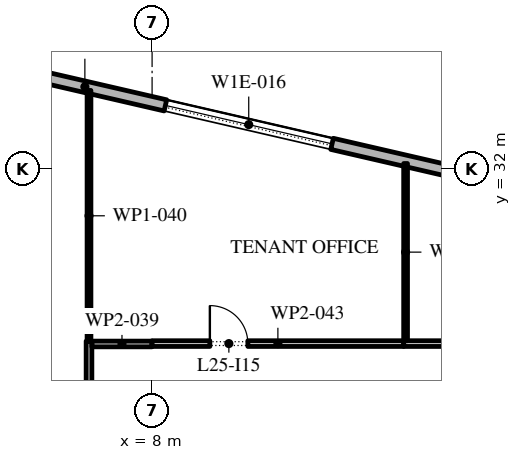
"""IFC4 building model, lengths in metres.
Left out: names, types, materials, properties, quantities, classifications, styles, units other than length and angle.
Written with IfcOpenShell. Run it as: python <this file> out.ifc"""

import sys

from ifc_helpers import new_model, si_unit, direction, frame, frame_2d, origin, place, context, subcontext, project, spatial, rectangle, extrude, element, fill, save


model = new_model("IFC4")
c1 = context("Model", 3, precision=1e-05, world=origin(), true_north=direction((0.0, 1.0)))
c2 = subcontext(c1, "Body", "Model", "MODEL_VIEW")
j1 = project(units=[si_unit("LENGTHUNIT", "METRE"), si_unit("PLANEANGLEUNIT", "RADIAN")], contexts=[c1])
p1 = place(None, origin())
s1 = spatial("IfcSite", under=j1, at=p1, CompositionType="ELEMENT")
p2 = place(p1, origin())
s2 = spatial("IfcBuilding", under=s1, at=p2, CompositionType="ELEMENT")
p3 = place(p2, frame((0.0, 0.0, 118.2)))
s3 = spatial("IfcBuildingStorey", under=s2, at=p3, CompositionType="ELEMENT", Elevation=118.2)
p4 = place(p3, frame((31.078, 28.421, 0.0), z_axis=(0.0, 0.0, 1.0), x_axis=(-0.974370456532, 0.224949357493, 0.0)))
e1 = element("IfcWall", 1, at=p4, inside=s3, PredefinedType="STANDARD", context=c2, shape_type="SweptSolid", body=[
    extrude(rectangle(XDim=51.0, YDim=0.3, at=frame_2d((25.5, 0.0))), origin(), (0.0, 0.0, 1.0), 4.0),
])
p5 = place(p4, frame((1.875, 0.0, 0.45)))
e2 = element("IfcOpeningElement", 2, at=p5, cuts=e1, PredefinedType="OPENING", context=c2, shape_type="SweptSolid", body=[
    extrude(rectangle(XDim=4.5, YDim=3.0, at=frame_2d((2.25, 1.5))), frame((0.0, 0.16, 0.0), z_axis=(0.0, -1.0, 0.0), x_axis=(1.0, 0.0, 0.0)), (0.0, 0.0, 1.0), 0.32),
])
p6 = place(p4, frame((10.275, 0.0, 0.45)))
e3 = element("IfcOpeningElement", 3, at=p6, cuts=e1, PredefinedType="OPENING", context=c2, shape_type="SweptSolid", body=[
    extrude(rectangle(XDim=4.5, YDim=2.875, at=frame_2d((2.25, 1.438))), frame((0.0, 0.16, 0.0), z_axis=(0.0, -1.0, 0.0), x_axis=(1.0, 0.0, 0.0)), (0.0, 0.0, 1.0), 0.32),
])
p7 = place(p4, frame((18.825, 0.0, 0.45)))
e4 = element("IfcOpeningElement", 4, at=p7, cuts=e1, PredefinedType="OPENING", context=c2, shape_type="SweptSolid", body=[
    extrude(rectangle(XDim=4.5, YDim=2.825, at=frame_2d((2.25, 1.413))), frame((0.0, 0.16, 0.0), z_axis=(0.0, -1.0, 0.0), x_axis=(1.0, 0.0, 0.0)), (0.0, 0.0, 1.0), 0.32),
])
p8 = place(p4, frame((27.075, 0.0, 0.0)))
e5 = element("IfcOpeningElement", 5, at=p8, cuts=e1, PredefinedType="OPENING", context=c2, shape_type="SweptSolid", body=[
    extrude(rectangle(XDim=2.4, YDim=3.2, at=frame_2d((1.2, 1.6))), frame((0.0, 0.16, 0.0), z_axis=(0.0, -1.0, 0.0), x_axis=(1.0, 0.0, 0.0)), (0.0, 0.0, 1.0), 0.32),
])
p9 = place(p4, frame((35.925, 0.0, 0.45)))
e6 = element("IfcOpeningElement", 6, at=p9, cuts=e1, PredefinedType="OPENING", context=c2, shape_type="SweptSolid", body=[
    extrude(rectangle(XDim=4.5, YDim=2.575, at=frame_2d((2.25, 1.288))), frame((0.0, 0.16, 0.0), z_axis=(0.0, -1.0, 0.0), x_axis=(1.0, 0.0, 0.0)), (0.0, 0.0, 1.0), 0.32),
])
p10 = place(p4, frame((44.475, 0.0, 0.45)))
e7 = element("IfcOpeningElement", 7, at=p10, cuts=e1, PredefinedType="OPENING", context=c2, shape_type="SweptSolid", body=[
    extrude(rectangle(XDim=4.5, YDim=3.05, at=frame_2d((2.25, 1.525))), frame((0.0, 0.16, 0.0), z_axis=(0.0, -1.0, 0.0), x_axis=(1.0, 0.0, 0.0)), (0.0, 0.0, 1.0), 0.32),
])
p11 = place(p3, frame((6.34, 19.075, 0.0), z_axis=(0.0, 0.0, 1.0), x_axis=(0.0, 1.0, 0.0)))
e8 = element("IfcWall", 8, at=p11, inside=s3, PredefinedType="PARTITIONING", context=c2, shape_type="SweptSolid", body=[
    extrude(rectangle(XDim=8.39, YDim=0.15, at=frame_2d((4.195, 0.0))), origin(), (0.0, 0.0, 1.0), 4.0),
])
p12 = place(p11, frame((3.665, 0.0, 0.0)))
e9 = element("IfcOpeningElement", 9, at=p12, cuts=e8, PredefinedType="OPENING", context=c2, shape_type="SweptSolid", body=[
    extrude(rectangle(XDim=1.0, YDim=2.1, at=frame_2d((0.5, 1.05))), frame((0.0, 0.085, 0.0), z_axis=(0.0, -1.0, 0.0), x_axis=(1.0, 0.0, 0.0)), (0.0, 0.0, 1.0), 0.17),
])
p13 = place(p3, frame((6.415, 27.39, 0.0), z_axis=(0.0, 0.0, 1.0), x_axis=(1.0, 0.0, 0.0)))
e10 = element("IfcWall", 10, at=p13, inside=s3, PredefinedType="PARTITIONING", context=c2, shape_type="SweptSolid", body=[
    extrude(rectangle(XDim=1.585, YDim=0.15, at=frame_2d((0.792, 0.0))), origin(), (0.0, 0.0, 1.0), 4.0),
])
p14 = place(p3, frame((6.34, 34.061, 0.0), z_axis=(0.0, 0.0, 1.0), x_axis=(0.0, -1.0, 0.0)))
e11 = element("IfcWall", 11, at=p14, inside=s3, PredefinedType="PARTITIONING", context=c2, shape_type="SweptSolid", body=[
    extrude(rectangle(XDim=6.596, YDim=0.1, at=frame_2d((3.298, 0.0))), origin(), (0.0, 0.0, 1.0), 4.0),
])
p15 = place(p3, frame((8.0, 27.4, 0.0), z_axis=(0.0, 0.0, 1.0), x_axis=(1.0, 0.0, 0.0)))
e12 = element("IfcWall", 12, at=p15, inside=s3, PredefinedType="PARTITIONING", context=c2, shape_type="SweptSolid", body=[
    extrude(rectangle(XDim=6.62, YDim=0.15, at=frame_2d((3.31, 0.0))), origin(), (0.0, 0.0, 1.0), 4.0),
])
p16 = place(p15, frame((1.52, 0.0, 0.0)))
e13 = element("IfcOpeningElement", 13, at=p16, cuts=e12, PredefinedType="OPENING", context=c2, shape_type="SweptSolid", body=[
    extrude(rectangle(XDim=1.0, YDim=2.1, at=frame_2d((0.5, 1.05))), frame((0.0, 0.085, 0.0), z_axis=(0.0, -1.0, 0.0), x_axis=(1.0, 0.0, 0.0)), (0.0, 0.0, 1.0), 0.17),
])
p17 = place(p3, frame((14.62, 27.4, 0.0), z_axis=(0.0, 0.0, 1.0), x_axis=(1.0, 0.0, 0.0)))
e14 = element("IfcWall", 14, at=p17, inside=s3, PredefinedType="PARTITIONING", context=c2, shape_type="SweptSolid", body=[
    extrude(rectangle(XDim=8.44, YDim=0.15, at=frame_2d((4.22, 0.0))), origin(), (0.0, 0.0, 1.0), 4.0),
])
p18 = place(p17, frame((2.99, 0.0, 0.0)))
e15 = element("IfcOpeningElement", 15, at=p18, cuts=e14, PredefinedType="OPENING", context=c2, shape_type="SweptSolid", body=[
    extrude(rectangle(XDim=1.0, YDim=2.1, at=frame_2d((0.5, 1.05))), frame((0.0, 0.085, 0.0), z_axis=(0.0, -1.0, 0.0), x_axis=(1.0, 0.0, 0.0)), (0.0, 0.0, 1.0), 0.17),
])
p19 = place(p3, frame((14.67, 32.138, 0.0), z_axis=(0.0, 0.0, 1.0), x_axis=(0.0, -1.0, 0.0)))
e16 = element("IfcWall", 16, at=p19, inside=s3, PredefinedType="PARTITIONING", context=c2, shape_type="SweptSolid", body=[
    extrude(rectangle(XDim=4.663, YDim=0.1, at=frame_2d((2.332, 0.0))), origin(), (0.0, 0.0, 1.0), 4.0),
])
p20 = place(p7, origin())
e17 = element("IfcWindow", 17, at=p20, inside=s3, PartitioningType="DOUBLE_PANEL_VERTICAL", PredefinedType="WINDOW", context=c2, shape_type="SweptSolid", body=[
    extrude(rectangle(XDim=4.5, YDim=2.825, at=frame_2d((2.25, 1.413))), frame((0.0, 0.03, 0.0), z_axis=(0.0, -1.0, 0.0), x_axis=(1.0, 0.0, 0.0)), (0.0, 0.0, 1.0), 0.06),
])
fill(e4, e17)
p21 = place(p16, origin())
e18 = element("IfcDoor", 18, at=p21, inside=s3, OperationType="SINGLE_SWING_RIGHT", PredefinedType="DOOR", context=c2, shape_type="SweptSolid", body=[
    extrude(rectangle(XDim=1.0, YDim=2.1, at=frame_2d((0.5, 1.05))), frame((0.0, 0.025, 0.0), z_axis=(0.0, -1.0, 0.0), x_axis=(1.0, 0.0, 0.0)), (0.0, 0.0, 1.0), 0.05),
])
fill(e13, e18)
save(model, sys.argv[1])
